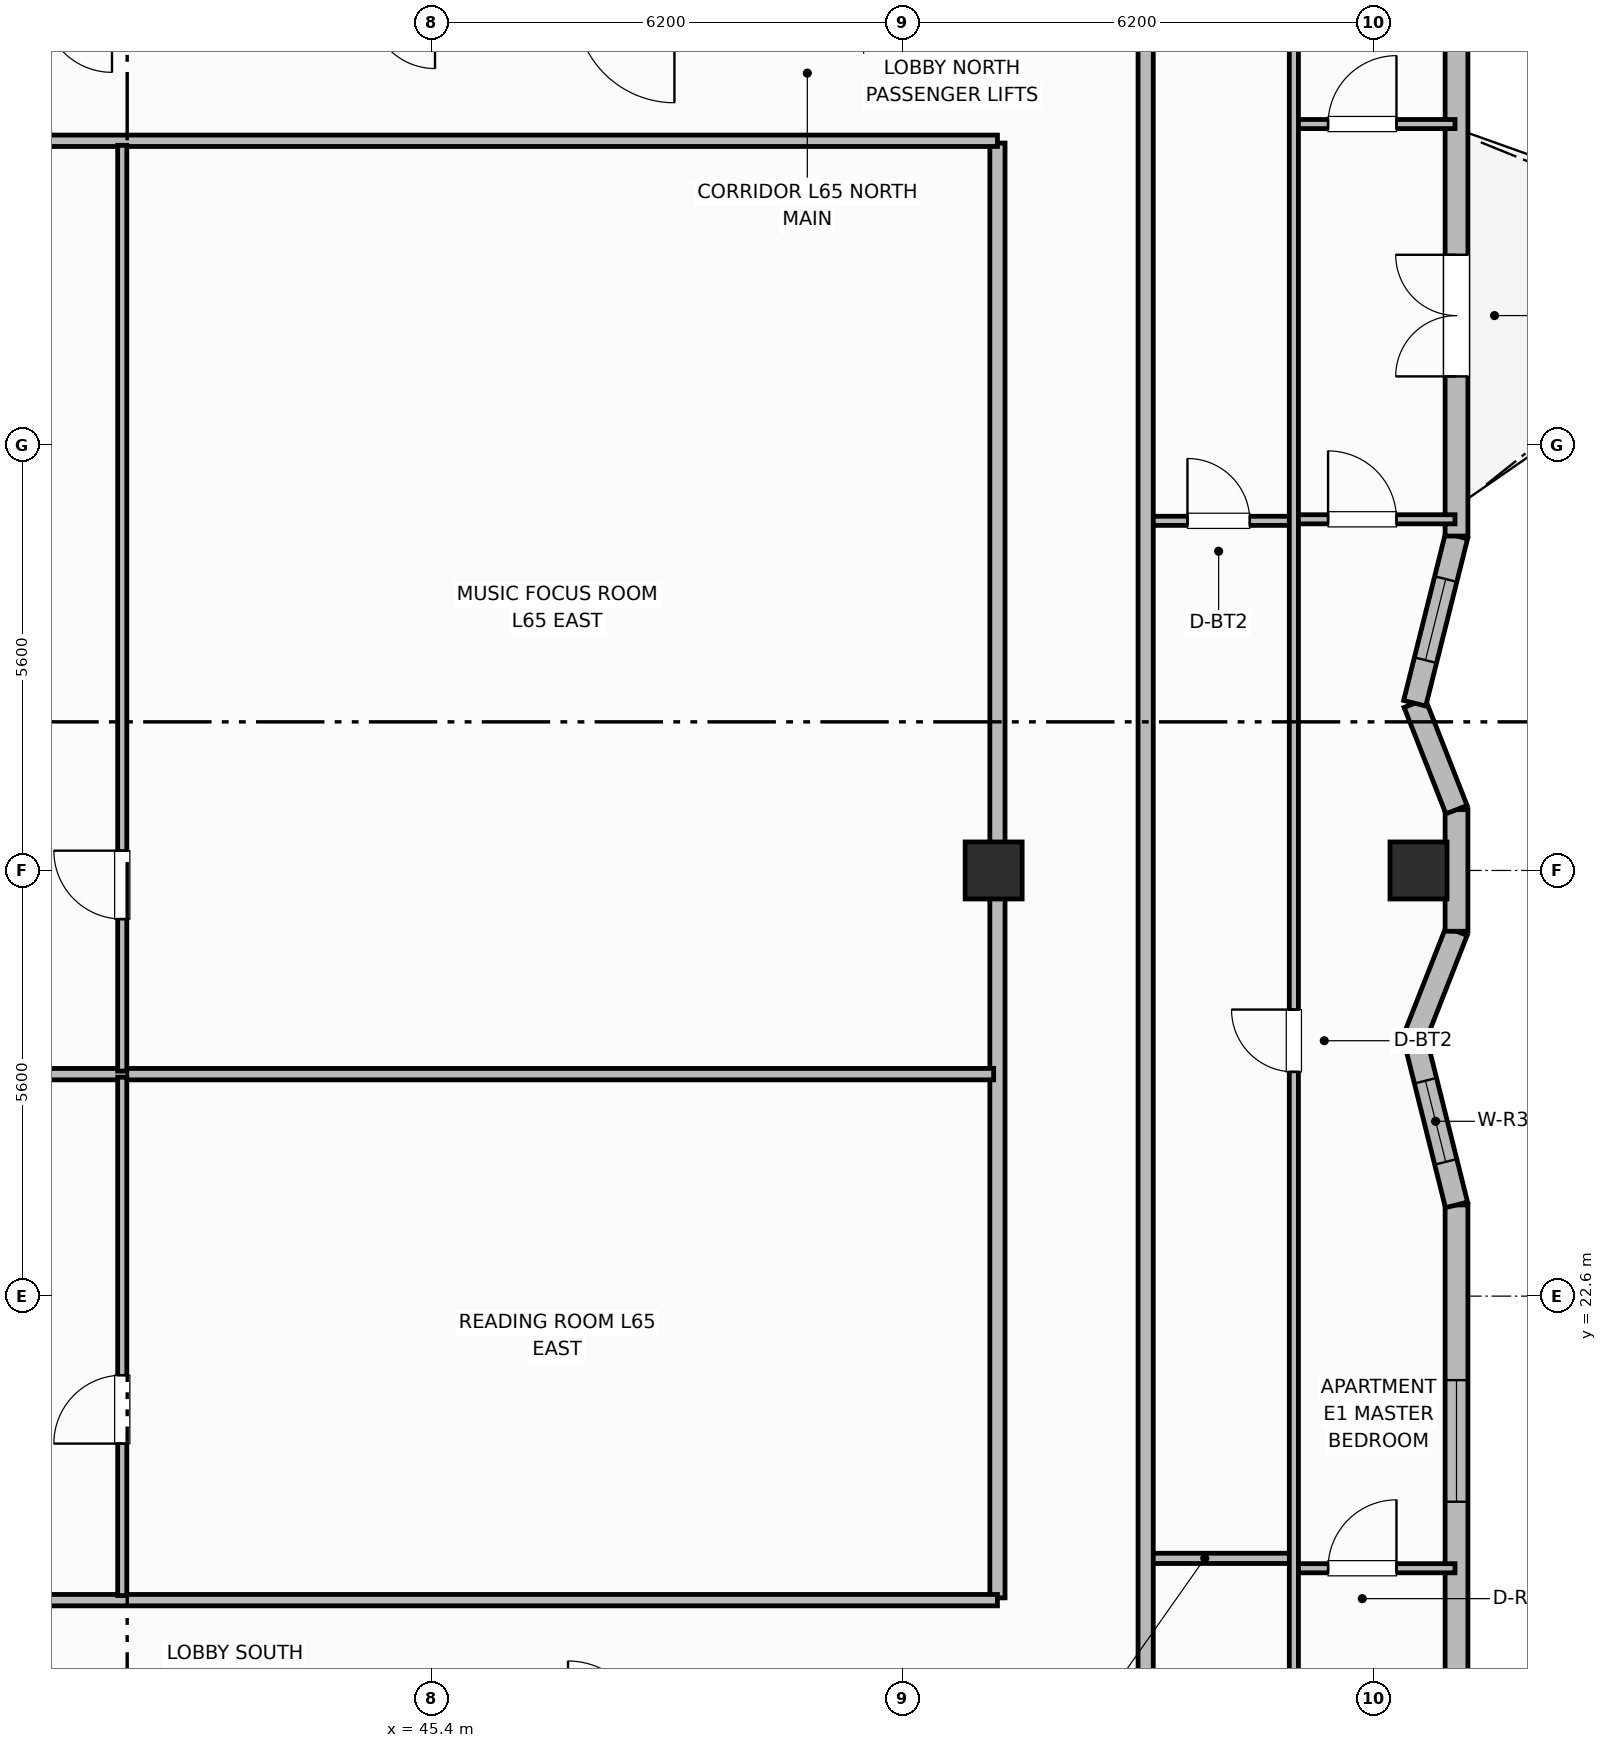
"""IFC4 building model, lengths in metres.
Left out: names, types, materials, properties, quantities, classifications, styles, units other than length and angle.
Written with IfcOpenShell. Run it as: python <this file> out.ifc"""

import sys

from ifc_helpers import new_model, si_unit, direction, frame, frame_2d, origin, origin_2d, place, context, subcontext, project, spatial, rectangle, extrude, element, fill, save


model = new_model("IFC4")
c1 = context("Model", 3, precision=1e-05, world=origin(), true_north=direction((0.0, 1.0)))
c2 = subcontext(c1, "Body", "Model", "MODEL_VIEW")
j1 = project(units=[si_unit("LENGTHUNIT", "METRE"), si_unit("PLANEANGLEUNIT", "RADIAN")], contexts=[c1])
p1 = place(None, origin())
s1 = spatial("IfcSite", under=j1, at=p1, CompositionType="ELEMENT")
p2 = place(p1, origin())
s2 = spatial("IfcBuilding", under=s1, at=p2, CompositionType="ELEMENT")
p3 = place(p2, frame((0.0, 0.0, 260.2)))
s3 = spatial("IfcBuildingStorey", under=s2, at=p3, CompositionType="ELEMENT", Elevation=260.2)
for number, where, z_axis, x_axis in (
    (1, (52.8, 28.2, 0.0), (0.0, 0.0, 1.0), (1.0, 0.0, 0.0)),
    (2, (58.39, 28.2, 0.0), (0.0, 0.0, 1.0), (1.0, 0.0, 0.0)),
):
    element("IfcColumn", number, at=place(p3, frame(where, z_axis=z_axis, x_axis=x_axis)), inside=s3, PredefinedType="COLUMN", context=c2, shape_type="SweptSolid", body=[
        extrude(rectangle(XDim=0.75, YDim=0.75, at=origin_2d()), origin(), (0.0, 0.0, 1.0), 3.7),
    ])
p4 = place(p3, frame((58.89, 12.68, 0.0), z_axis=(0.0, 0.0, 1.0), x_axis=(0.0, 1.0, 0.0)))
e3 = element("IfcWall", 3, at=p4, inside=s3, PredefinedType="SOLIDWALL", context=c2, shape_type="SweptSolid", body=[
    extrude(rectangle(XDim=11.12, YDim=0.3, at=frame_2d((5.56, 0.0))), origin(), (0.0, 0.0, 1.0), 2.73),
])
p5 = place(p4, frame((1.255, 0.0, 0.71)))
e4 = element("IfcOpeningElement", 4, at=p5, cuts=e3, PredefinedType="OPENING", context=c2, shape_type="SweptSolid", body=[
    extrude(rectangle(XDim=1.6, YDim=1.9, at=frame_2d((0.8, 0.95))), frame((0.0, 0.16, 0.0), z_axis=(0.0, -1.0, 0.0), x_axis=(1.0, 0.0, 0.0)), (0.0, 0.0, 1.0), 0.32),
])
p6 = place(p4, frame((7.215, 0.0, 0.71)))
e5 = element("IfcOpeningElement", 5, at=p6, cuts=e3, PredefinedType="OPENING", context=c2, shape_type="SweptSolid", body=[
    extrude(rectangle(XDim=1.6, YDim=1.9, at=frame_2d((0.8, 0.95))), frame((0.0, 0.16, 0.0), z_axis=(0.0, -1.0, 0.0), x_axis=(1.0, 0.0, 0.0)), (0.0, 0.0, 1.0), 0.32),
])
p7 = place(p3, frame((58.89, 23.8, 0.0), z_axis=(0.0, 0.0, 1.0), x_axis=(-0.242459626081, 0.970161496721, 0.0)))
e6 = element("IfcWall", 6, at=p7, inside=s3, PredefinedType="SOLIDWALL", context=c2, shape_type="SweptSolid", body=[
    extrude(rectangle(XDim=2.268, YDim=0.3, at=frame_2d((1.134, 0.0))), origin(), (0.0, 0.0, 1.0), 2.73),
])
p8 = place(p7, frame((0.584, 0.0, 0.92)))
e7 = element("IfcOpeningElement", 7, at=p8, cuts=e6, PredefinedType="OPENING", context=c2, shape_type="SweptSolid", body=[
    extrude(rectangle(XDim=1.1, YDim=1.65, at=frame_2d((0.55, 0.825))), frame((0.0, 0.16, 0.0), z_axis=(0.0, -1.0, 0.0), x_axis=(1.0, 0.0, 0.0)), (0.0, 0.0, 1.0), 0.32),
])
p9 = place(p3, frame((58.34, 26.0, 0.0), z_axis=(0.0, 0.0, 1.0), x_axis=(0.365561969418, 0.930787003839, 0.0)))
e8 = element("IfcWall", 8, at=p9, inside=s3, PredefinedType="SOLIDWALL", context=c2, shape_type="SweptSolid", body=[
    extrude(rectangle(XDim=1.504, YDim=0.3, at=frame_2d((0.752, 0.0))), origin(), (0.0, 0.0, 1.0), 2.73),
])
p10 = place(p3, frame((58.89, 27.4, 0.0), z_axis=(0.0, 0.0, 1.0), x_axis=(0.0, 1.0, 0.0)))
e9 = element("IfcWall", 9, at=p10, inside=s3, PredefinedType="SOLIDWALL", context=c2, shape_type="SweptSolid", body=[
    extrude(rectangle(XDim=1.6, YDim=0.3, at=frame_2d((0.8, 0.0))), origin(), (0.0, 0.0, 1.0), 2.73),
])
p11 = place(p3, frame((58.89, 29.0, 0.0), z_axis=(0.0, 0.0, 1.0), x_axis=(-0.365561969418, 0.930787003839, 0.0)))
e10 = element("IfcWall", 10, at=p11, inside=s3, PredefinedType="SOLIDWALL", context=c2, shape_type="SweptSolid", body=[
    extrude(rectangle(XDim=1.504, YDim=0.3, at=frame_2d((0.752, 0.0))), origin(), (0.0, 0.0, 1.0), 2.73),
])
p12 = place(p3, frame((58.34, 30.4, 0.0), z_axis=(0.0, 0.0, 1.0), x_axis=(0.242434303349, 0.970167824946, 0.0)))
e11 = element("IfcWall", 11, at=p12, inside=s3, PredefinedType="SOLIDWALL", context=c2, shape_type="SweptSolid", body=[
    extrude(rectangle(XDim=2.268, YDim=0.3, at=frame_2d((1.134, 0.0))), origin(), (0.0, 0.0, 1.0), 2.73),
])
p13 = place(p12, frame((0.584, 0.0, 0.92)))
e12 = element("IfcOpeningElement", 12, at=p13, cuts=e11, PredefinedType="OPENING", context=c2, shape_type="SweptSolid", body=[
    extrude(rectangle(XDim=1.1, YDim=1.65, at=frame_2d((0.55, 0.825))), frame((0.0, 0.16, 0.0), z_axis=(0.0, -1.0, 0.0), x_axis=(1.0, 0.0, 0.0)), (0.0, 0.0, 1.0), 0.32),
])
p14 = place(p3, frame((58.89, 32.6, 0.0), z_axis=(0.0, 0.0, 1.0), x_axis=(0.0, 1.0, 0.0)))
e13 = element("IfcWall", 13, at=p14, inside=s3, PredefinedType="SOLIDWALL", context=c2, shape_type="SweptSolid", body=[
    extrude(rectangle(XDim=11.12, YDim=0.3, at=frame_2d((5.56, 0.0))), origin(), (0.0, 0.0, 1.0), 2.73),
])
p15 = place(p14, frame((2.1, 0.0, 0.0)))
e14 = element("IfcOpeningElement", 14, at=p15, cuts=e13, PredefinedType="OPENING", context=c2, shape_type="SweptSolid", body=[
    extrude(rectangle(XDim=1.6, YDim=2.1, at=frame_2d((0.8, 1.05))), frame((0.0, 0.16, 0.0), z_axis=(0.0, -1.0, 0.0), x_axis=(1.0, 0.0, 0.0)), (0.0, 0.0, 1.0), 0.32),
])
p16 = place(p14, frame((8.483, 0.0, 0.76)))
e15 = element("IfcOpeningElement", 15, at=p16, cuts=e13, PredefinedType="OPENING", context=c2, shape_type="SweptSolid", body=[
    extrude(rectangle(XDim=1.4, YDim=1.85, at=frame_2d((0.7, 0.925))), frame((0.0, 0.16, 0.0), z_axis=(0.0, -1.0, 0.0), x_axis=(1.0, 0.0, 0.0)), (0.0, 0.0, 1.0), 0.32),
])
p17 = place(p3, frame((52.85, 18.63, 0.0), z_axis=(0.0, 0.0, 1.0), x_axis=(0.0, 1.0, 0.0)))
e16 = element("IfcWall", 16, at=p17, inside=s3, PredefinedType="PARTITIONING", context=c2, shape_type="SweptSolid", body=[
    extrude(rectangle(XDim=19.14, YDim=0.2, at=frame_2d((9.57, 0.0))), origin(), (0.0, 0.0, 1.0), 2.56),
])
for number, where, z_axis, x_axis in (
    (17, (29.9, 18.6, 0.0), (0.0, 0.0, 1.0), (1.0, 0.0, 0.0)),
    (18, (29.9, 37.8, 0.0), (0.0, 0.0, 1.0), (1.0, 0.0, 0.0)),
):
    element("IfcWall", number, at=place(p3, frame(where, z_axis=z_axis, x_axis=x_axis)), inside=s3, PredefinedType="PARTITIONING", context=c2, shape_type="SweptSolid", body=[
        extrude(rectangle(XDim=22.95, YDim=0.15, at=frame_2d((11.475, 0.0))), origin(), (0.0, 0.0, 1.0), 2.56),
    ])
p18 = place(p3, frame((29.93, 25.521, 0.0), z_axis=(0.0, 0.0, 1.0), x_axis=(1.0, 0.0, 0.0)))
e19 = element("IfcWall", 19, at=p18, inside=s3, PredefinedType="PARTITIONING", context=c2, shape_type="SweptSolid", body=[
    extrude(rectangle(XDim=22.87, YDim=0.15, at=frame_2d((11.435, 0.0))), origin(), (0.0, 0.0, 1.0), 2.56),
])
p19 = place(p3, frame((41.335, 18.66, 0.0), z_axis=(0.0, 0.0, 1.0), x_axis=(0.0, 1.0, 0.0)))
e20 = element("IfcWall", 20, at=p19, inside=s3, PredefinedType="PARTITIONING", context=c2, shape_type="SweptSolid", body=[
    extrude(rectangle(XDim=6.821, YDim=0.12, at=frame_2d((3.41, 0.0))), origin(), (0.0, 0.0, 1.0), 2.56),
])
p20 = place(p19, frame((2.0, 0.0, 0.0)))
e21 = element("IfcOpeningElement", 21, at=p20, cuts=e20, PredefinedType="OPENING", context=c2, shape_type="SweptSolid", body=[
    extrude(rectangle(XDim=0.9, YDim=2.1, at=frame_2d((0.45, 1.05))), frame((0.0, 0.07, 0.0), z_axis=(0.0, -1.0, 0.0), x_axis=(1.0, 0.0, 0.0)), (0.0, 0.0, 1.0), 0.14),
])
p21 = place(p3, frame((41.335, 25.56, 0.0), z_axis=(0.0, 0.0, 1.0), x_axis=(0.0, 1.0, 0.0)))
e22 = element("IfcWall", 22, at=p21, inside=s3, PredefinedType="PARTITIONING", context=c2, shape_type="SweptSolid", body=[
    extrude(rectangle(XDim=12.18, YDim=0.12, at=frame_2d((6.09, 0.0))), origin(), (0.0, 0.0, 1.0), 2.56),
])
p22 = place(p21, frame((2.0, 0.0, 0.0)))
e23 = element("IfcOpeningElement", 23, at=p22, cuts=e22, PredefinedType="OPENING", context=c2, shape_type="SweptSolid", body=[
    extrude(rectangle(XDim=0.9, YDim=2.1, at=frame_2d((0.45, 1.05))), frame((0.0, 0.07, 0.0), z_axis=(0.0, -1.0, 0.0), x_axis=(1.0, 0.0, 0.0)), (0.0, 0.0, 1.0), 0.14),
])
p23 = place(p3, frame((54.8, 19.15, 0.0), z_axis=(0.0, 0.0, 1.0), x_axis=(1.0, 0.0, 0.0)))
e24 = element("IfcWall", 24, at=p23, inside=s3, PredefinedType="PARTITIONING", context=c2, shape_type="SweptSolid", body=[
    extrude(rectangle(XDim=1.95, YDim=0.135, at=frame_2d((0.975, 0.0))), origin(), (0.0, 0.0, 1.0), 2.56),
])
p24 = place(p3, frame((54.8, 32.8, 0.0), z_axis=(0.0, 0.0, 1.0), x_axis=(1.0, 0.0, 0.0)))
e25 = element("IfcWall", 25, at=p24, inside=s3, PredefinedType="PARTITIONING", context=c2, shape_type="SweptSolid", body=[
    extrude(rectangle(XDim=1.95, YDim=0.12, at=frame_2d((0.975, 0.0))), origin(), (0.0, 0.0, 1.0), 2.56),
])
p25 = place(p24, frame((0.55, 0.0, 0.0)))
e26 = element("IfcOpeningElement", 26, at=p25, cuts=e25, PredefinedType="OPENING", context=c2, shape_type="SweptSolid", body=[
    extrude(rectangle(XDim=0.82, YDim=2.08, at=frame_2d((0.41, 1.04))), frame((0.0, 0.07, 0.0), z_axis=(0.0, -1.0, 0.0), x_axis=(1.0, 0.0, 0.0)), (0.0, 0.0, 1.0), 0.14),
])
p26 = place(p3, frame((56.75, 19.02, 0.0), z_axis=(0.0, 0.0, 1.0), x_axis=(1.0, 0.0, 0.0)))
e27 = element("IfcWall", 27, at=p26, inside=s3, PredefinedType="PARTITIONING", context=c2, shape_type="SweptSolid", body=[
    extrude(rectangle(XDim=2.12, YDim=0.12, at=frame_2d((1.06, 0.0))), origin(), (0.0, 0.0, 1.0), 2.56),
])
p27 = place(p26, frame((0.45, 0.0, 0.0)))
e28 = element("IfcOpeningElement", 28, at=p27, cuts=e27, PredefinedType="OPENING", context=c2, shape_type="SweptSolid", body=[
    extrude(rectangle(XDim=0.9, YDim=2.1, at=frame_2d((0.45, 1.05))), frame((0.0, 0.07, 0.0), z_axis=(0.0, -1.0, 0.0), x_axis=(1.0, 0.0, 0.0)), (0.0, 0.0, 1.0), 0.14),
])
p28 = place(p3, frame((56.75, 32.82, 0.0), z_axis=(0.0, 0.0, 1.0), x_axis=(1.0, 0.0, 0.0)))
e29 = element("IfcWall", 29, at=p28, inside=s3, PredefinedType="PARTITIONING", context=c2, shape_type="SweptSolid", body=[
    extrude(rectangle(XDim=2.12, YDim=0.12, at=frame_2d((1.06, 0.0))), origin(), (0.0, 0.0, 1.0), 2.56),
])
p29 = place(p28, frame((0.45, 0.0, 0.0)))
e30 = element("IfcOpeningElement", 30, at=p29, cuts=e29, PredefinedType="OPENING", context=c2, shape_type="SweptSolid", body=[
    extrude(rectangle(XDim=0.9, YDim=2.1, at=frame_2d((0.45, 1.05))), frame((0.0, 0.07, 0.0), z_axis=(0.0, -1.0, 0.0), x_axis=(1.0, 0.0, 0.0)), (0.0, 0.0, 1.0), 0.14),
])
p30 = place(p3, frame((56.75, 38.02, 0.0), z_axis=(0.0, 0.0, 1.0), x_axis=(1.0, 0.0, 0.0)))
e31 = element("IfcWall", 31, at=p30, inside=s3, PredefinedType="PARTITIONING", context=c2, shape_type="SweptSolid", body=[
    extrude(rectangle(XDim=2.12, YDim=0.12, at=frame_2d((1.06, 0.0))), origin(), (0.0, 0.0, 1.0), 2.56),
])
p31 = place(p30, frame((0.45, 0.0, 0.0)))
e32 = element("IfcOpeningElement", 32, at=p31, cuts=e31, PredefinedType="OPENING", context=c2, shape_type="SweptSolid", body=[
    extrude(rectangle(XDim=0.9, YDim=2.1, at=frame_2d((0.45, 1.05))), frame((0.0, 0.07, 0.0), z_axis=(0.0, -1.0, 0.0), x_axis=(1.0, 0.0, 0.0)), (0.0, 0.0, 1.0), 0.14),
])
p32 = place(p3, frame((56.75, 9.99, 0.0), z_axis=(0.0, 0.0, 1.0), x_axis=(0.0, 1.0, 0.0)))
e33 = element("IfcWall", 33, at=p32, inside=s3, PredefinedType="PARTITIONING", context=c2, shape_type="SweptSolid", body=[
    extrude(rectangle(XDim=36.42, YDim=0.12, at=frame_2d((18.21, 0.0))), origin(), (0.0, 0.0, 1.0), 2.56),
])
p33 = place(p32, frame((0.41, 0.0, 0.0)))
e34 = element("IfcOpeningElement", 34, at=p33, cuts=e33, PredefinedType="OPENING", context=c2, shape_type="SweptSolid", body=[
    extrude(rectangle(XDim=0.9, YDim=2.1, at=frame_2d((0.45, 1.05))), frame((0.0, 0.07, 0.0), z_axis=(0.0, -1.0, 0.0), x_axis=(1.0, 0.0, 0.0)), (0.0, 0.0, 1.0), 0.14),
])
p34 = place(p32, frame((15.56, 0.0, 0.0)))
e35 = element("IfcOpeningElement", 35, at=p34, cuts=e33, PredefinedType="OPENING", context=c2, shape_type="SweptSolid", body=[
    extrude(rectangle(XDim=0.82, YDim=2.08, at=frame_2d((0.41, 1.04))), frame((0.0, 0.07, 0.0), z_axis=(0.0, -1.0, 0.0), x_axis=(1.0, 0.0, 0.0)), (0.0, 0.0, 1.0), 0.14),
])
p35 = place(p3, frame((54.8, 9.95, 0.0), z_axis=(0.0, 0.0, 1.0), x_axis=(0.0, 1.0, 0.0)))
e36 = element("IfcWall", 36, at=p35, inside=s3, PredefinedType="PARTITIONING", context=c2, shape_type="SweptSolid", body=[
    extrude(rectangle(XDim=36.5, YDim=0.2, at=frame_2d((18.25, 0.0))), origin(), (0.0, 0.0, 1.0), 2.56),
])
p36 = place(p35, frame((3.25, 0.0, 0.0)))
e37 = element("IfcOpeningElement", 37, at=p36, cuts=e36, PredefinedType="OPENING", context=c2, shape_type="SweptSolid", body=[
    extrude(rectangle(XDim=1.0, YDim=2.15, at=frame_2d((0.5, 1.075))), frame((0.0, 0.11, 0.0), z_axis=(0.0, -1.0, 0.0), x_axis=(1.0, 0.0, 0.0)), (0.0, 0.0, 1.0), 0.22),
])
p37 = place(p6, origin())
e38 = element("IfcWindow", 38, at=p37, inside=s3, PartitioningType="SINGLE_PANEL", PredefinedType="WINDOW", context=c2, shape_type="SweptSolid", body=[
    extrude(rectangle(XDim=1.6, YDim=1.9, at=frame_2d((0.8, 0.95))), frame((0.0, 0.03, 0.0), z_axis=(0.0, -1.0, 0.0), x_axis=(1.0, 0.0, 0.0)), (0.0, 0.0, 1.0), 0.06),
])
fill(e5, e38)
p38 = place(p8, origin())
e39 = element("IfcWindow", 39, at=p38, inside=s3, PartitioningType="SINGLE_PANEL", PredefinedType="WINDOW", context=c2, shape_type="SweptSolid", body=[
    extrude(rectangle(XDim=1.1, YDim=1.65, at=frame_2d((0.55, 0.825))), frame((0.0, 0.03, 0.0), z_axis=(0.0, -1.0, 0.0), x_axis=(1.0, 0.0, 0.0)), (0.0, 0.0, 1.0), 0.06),
])
fill(e7, e39)
p39 = place(p13, origin())
e40 = element("IfcWindow", 40, at=p39, inside=s3, PartitioningType="SINGLE_PANEL", PredefinedType="WINDOW", context=c2, shape_type="SweptSolid", body=[
    extrude(rectangle(XDim=1.1, YDim=1.65, at=frame_2d((0.55, 0.825))), frame((0.0, 0.03, 0.0), z_axis=(0.0, -1.0, 0.0), x_axis=(1.0, 0.0, 0.0)), (0.0, 0.0, 1.0), 0.06),
])
fill(e12, e40)
p40 = place(p15, origin())
e41 = element("IfcDoor", 41, at=p40, inside=s3, OperationType="DOUBLE_DOOR_SINGLE_SWING", PredefinedType="DOOR", context=c2, shape_type="SweptSolid", body=[
    extrude(rectangle(XDim=1.6, YDim=2.1, at=frame_2d((0.8, 1.05))), frame((0.0, 0.025, 0.0), z_axis=(0.0, -1.0, 0.0), x_axis=(1.0, 0.0, 0.0)), (0.0, 0.0, 1.0), 0.05),
])
fill(e14, e41)
p41 = place(p20, origin())
e42 = element("IfcDoor", 42, at=p41, inside=s3, OperationType="SINGLE_SWING_LEFT", PredefinedType="DOOR", context=c2, shape_type="SweptSolid", body=[
    extrude(rectangle(XDim=0.9, YDim=2.1, at=frame_2d((0.45, 1.05))), frame((0.0, 0.025, 0.0), z_axis=(0.0, -1.0, 0.0), x_axis=(1.0, 0.0, 0.0)), (0.0, 0.0, 1.0), 0.05),
])
fill(e21, e42)
p42 = place(p22, origin())
e43 = element("IfcDoor", 43, at=p42, inside=s3, OperationType="SINGLE_SWING_RIGHT", PredefinedType="DOOR", context=c2, shape_type="SweptSolid", body=[
    extrude(rectangle(XDim=0.9, YDim=2.1, at=frame_2d((0.45, 1.05))), frame((0.0, 0.025, 0.0), z_axis=(0.0, -1.0, 0.0), x_axis=(1.0, 0.0, 0.0)), (0.0, 0.0, 1.0), 0.05),
])
fill(e23, e43)
p43 = place(p25, origin())
e44 = element("IfcDoor", 44, at=p43, inside=s3, OperationType="SINGLE_SWING_LEFT", PredefinedType="DOOR", context=c2, shape_type="SweptSolid", body=[
    extrude(rectangle(XDim=0.82, YDim=2.08, at=frame_2d((0.41, 1.04))), frame((0.0, 0.025, 0.0), z_axis=(0.0, -1.0, 0.0), x_axis=(1.0, 0.0, 0.0)), (0.0, 0.0, 1.0), 0.05),
])
fill(e26, e44)
p44 = place(p27, origin())
e45 = element("IfcDoor", 45, at=p44, inside=s3, OperationType="SINGLE_SWING_RIGHT", PredefinedType="DOOR", context=c2, shape_type="SweptSolid", body=[
    extrude(rectangle(XDim=0.9, YDim=2.1, at=frame_2d((0.45, 1.05))), frame((0.0, 0.025, 0.0), z_axis=(0.0, -1.0, 0.0), x_axis=(1.0, 0.0, 0.0)), (0.0, 0.0, 1.0), 0.05),
])
fill(e28, e45)
p45 = place(p29, origin())
e46 = element("IfcDoor", 46, at=p45, inside=s3, OperationType="SINGLE_SWING_LEFT", PredefinedType="DOOR", context=c2, shape_type="SweptSolid", body=[
    extrude(rectangle(XDim=0.9, YDim=2.1, at=frame_2d((0.45, 1.05))), frame((0.0, 0.025, 0.0), z_axis=(0.0, -1.0, 0.0), x_axis=(1.0, 0.0, 0.0)), (0.0, 0.0, 1.0), 0.05),
])
fill(e30, e46)
p46 = place(p31, origin())
e47 = element("IfcDoor", 47, at=p46, inside=s3, OperationType="SINGLE_SWING_RIGHT", PredefinedType="DOOR", context=c2, shape_type="SweptSolid", body=[
    extrude(rectangle(XDim=0.9, YDim=2.1, at=frame_2d((0.45, 1.05))), frame((0.0, 0.025, 0.0), z_axis=(0.0, -1.0, 0.0), x_axis=(1.0, 0.0, 0.0)), (0.0, 0.0, 1.0), 0.05),
])
fill(e32, e47)
p47 = place(p34, origin())
e48 = element("IfcDoor", 48, at=p47, inside=s3, OperationType="SINGLE_SWING_RIGHT", PredefinedType="DOOR", context=c2, shape_type="SweptSolid", body=[
    extrude(rectangle(XDim=0.82, YDim=2.08, at=frame_2d((0.41, 1.04))), frame((0.0, 0.025, 0.0), z_axis=(0.0, -1.0, 0.0), x_axis=(1.0, 0.0, 0.0)), (0.0, 0.0, 1.0), 0.05),
])
fill(e35, e48)
save(model, sys.argv[1])
